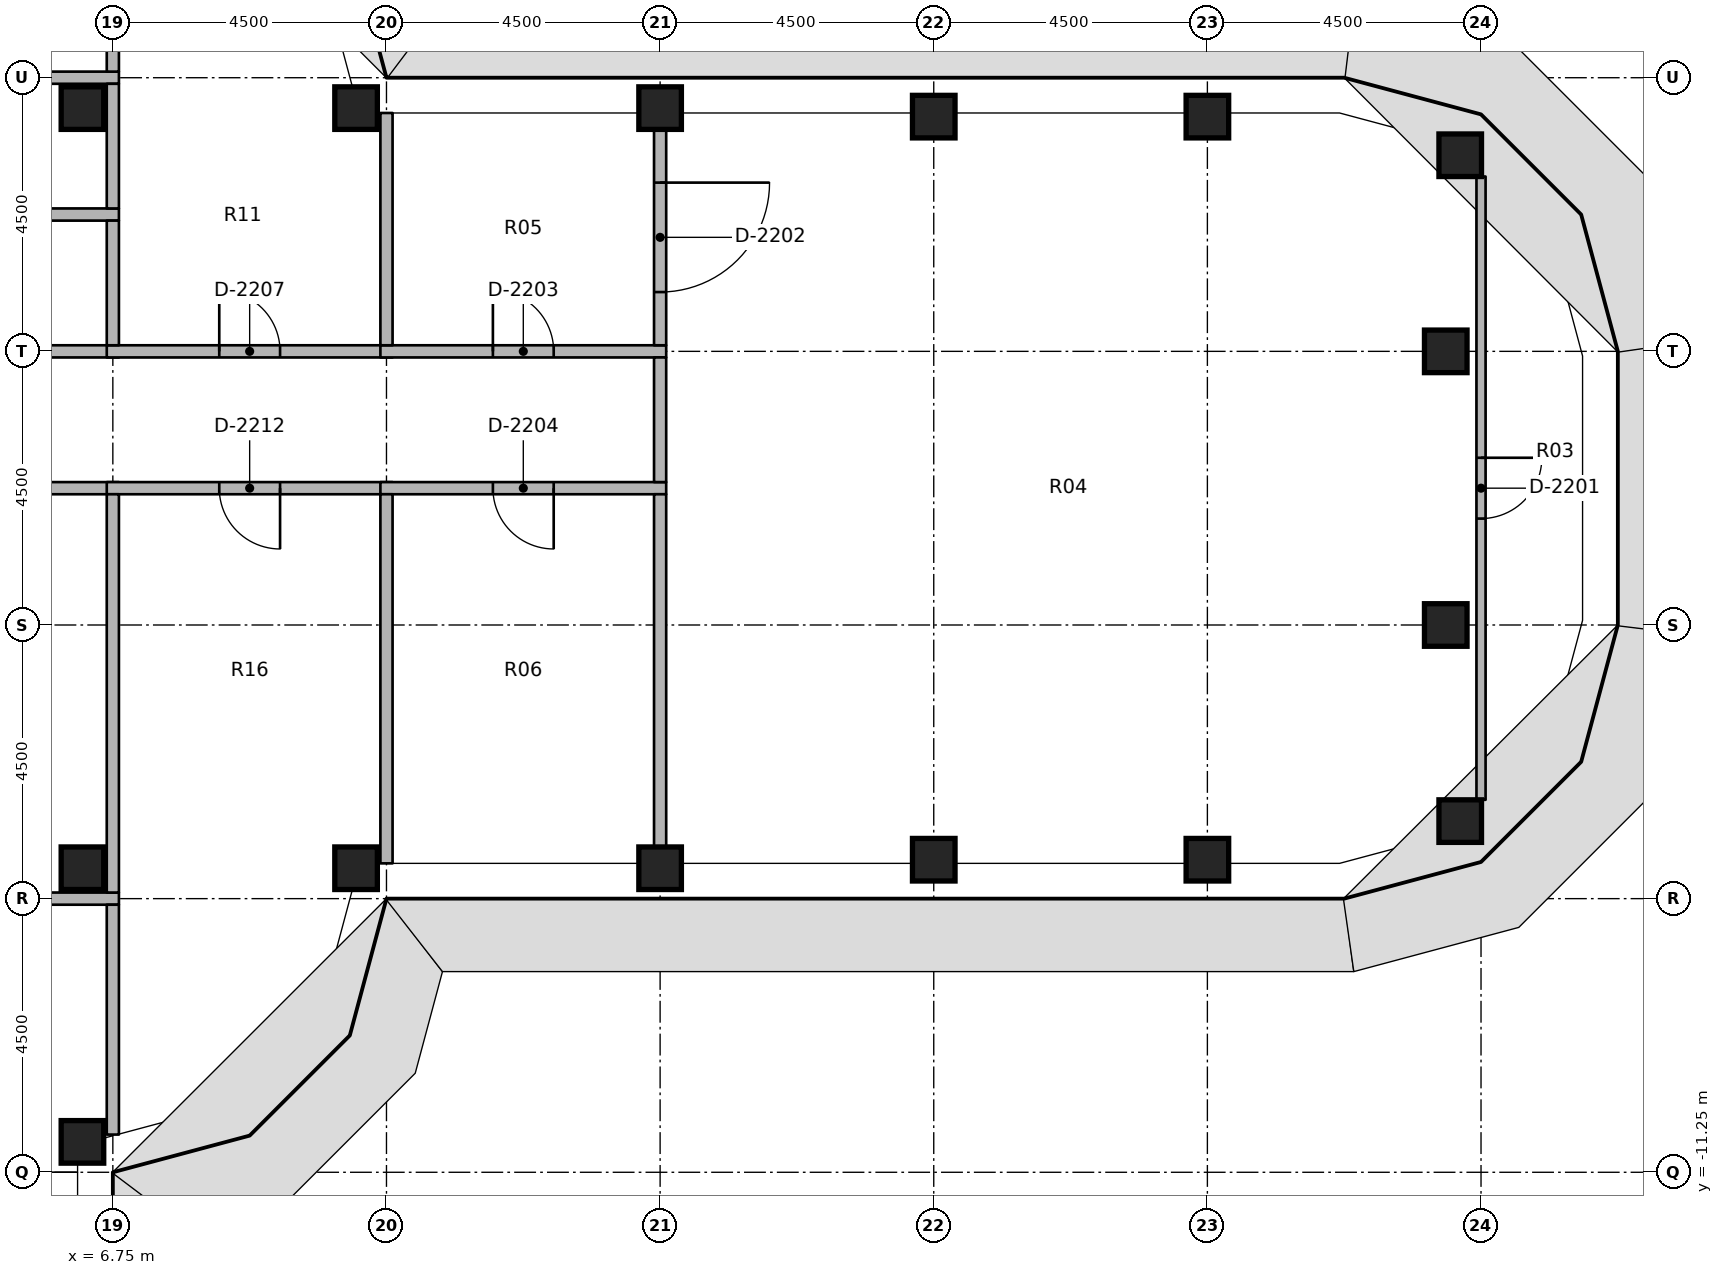
"""IFC4 building model, lengths in metres.
Left out: names, types, materials, properties, quantities, classifications, styles, units other than length and angle.
Written with IfcOpenShell. Run it as: python <this file> out.ifc"""

import sys

from ifc_helpers import new_model, si_unit, direction, frame, frame_2d, origin, origin_2d, place, context, subcontext, project, spatial, rectangle, extrude, element, fill, save


model = new_model("IFC4")
c1 = context("Model", 3, precision=1e-05, world=origin(), true_north=direction((0.0, 1.0)))
c2 = subcontext(c1, "Body", "Model", "MODEL_VIEW")
j1 = project(units=[si_unit("LENGTHUNIT", "METRE"), si_unit("PLANEANGLEUNIT", "RADIAN")], contexts=[c1])
p1 = place(None, origin())
s1 = spatial("IfcSite", under=j1, at=p1, CompositionType="ELEMENT")
p2 = place(p1, origin())
s2 = spatial("IfcBuilding", under=s1, at=p2, CompositionType="ELEMENT")
p3 = place(p2, frame((0.0, 0.0, 206.8)))
s3 = spatial("IfcBuildingStorey", under=s2, at=p3, CompositionType="ELEMENT", Elevation=206.8)
for number, where, z_axis, x_axis in (
    (1, (6.25, -10.75, 0.0), (0.0, 0.0, 1.0), (1.0, 0.0, 0.0)),
    (2, (6.25, -6.25, 0.0), (0.0, 0.0, 1.0), (1.0, 0.0, 0.0)),
    (3, (6.25, 6.25, 0.0), (0.0, 0.0, 1.0), (1.0, 0.0, 0.0)),
    (4, (10.75, -6.25, 0.0), (0.0, 0.0, 1.0), (1.0, 0.0, 0.0)),
    (5, (10.75, 6.25, 0.0), (0.0, 0.0, 1.0), (1.0, 0.0, 0.0)),
    (6, (15.75, -6.25, 0.0), (0.0, 0.0, 1.0), (1.0, 0.0, 0.0)),
    (7, (15.75, 6.25, 0.0), (0.0, 0.0, 1.0), (1.0, 0.0, 0.0)),
    (8, (20.25, -6.11, 0.0), (0.0, 0.0, 1.0), (1.0, 0.0, 0.0)),
    (9, (20.25, 6.11, 0.0), (0.0, 0.0, 1.0), (1.0, 0.0, 0.0)),
    (10, (24.75, -6.11, 0.0), (0.0, 0.0, 1.0), (1.0, 0.0, 0.0)),
    (11, (24.75, 6.11, 0.0), (0.0, 0.0, 1.0), (1.0, 0.0, 0.0)),
    (12, (28.908, -5.475, 0.0), (0.0, 0.0, 1.0), (1.0, 0.0, 0.0)),
    (13, (28.67, -2.25, 0.0), (0.0, 0.0, 1.0), (1.0, 0.0, 0.0)),
    (14, (28.67, 2.25, 0.0), (0.0, 0.0, 1.0), (1.0, 0.0, 0.0)),
    (15, (28.908, 5.475, 0.0), (0.0, 0.0, 1.0), (1.0, 0.0, 0.0)),
):
    element("IfcColumn", number, at=place(p3, frame(where, z_axis=z_axis, x_axis=x_axis)), inside=s3, PredefinedType="COLUMN", context=c2, shape_type="SweptSolid", body=[
        extrude(rectangle(XDim=0.7, YDim=0.7, at=origin_2d()), origin(), (0.0, 0.0, 1.0), 3.65),
    ])
p4 = place(p3, frame((1.025, 2.25, 0.0), z_axis=(0.0, 0.0, 1.0), x_axis=(1.0, 0.0, 0.0)))
e16 = element("IfcWall", 16, at=p4, inside=s3, PredefinedType="PARTITIONING", context=c2, shape_type="SweptSolid", body=[
    extrude(rectangle(XDim=5.825, YDim=0.2, at=frame_2d((2.913, 0.0))), origin(), (0.0, 0.0, 1.0), 2.75),
])
p5 = place(p4, frame((2.462, 0.0, 0.0)))
e17 = element("IfcOpeningElement", 17, at=p5, cuts=e16, PredefinedType="OPENING", context=c2, shape_type="SweptSolid", body=[
    extrude(rectangle(XDim=0.9, YDim=2.1, at=frame_2d((0.45, 1.05))), frame((0.0, 0.11, 0.0), z_axis=(0.0, -1.0, 0.0), x_axis=(1.0, 0.0, 0.0)), (0.0, 0.0, 1.0), 0.22),
])
p6 = place(p3, frame((6.65, 2.25, 0.0), z_axis=(0.0, 0.0, 1.0), x_axis=(1.0, 0.0, 0.0)))
e18 = element("IfcWall", 18, at=p6, inside=s3, PredefinedType="PARTITIONING", context=c2, shape_type="SweptSolid", body=[
    extrude(rectangle(XDim=4.7, YDim=0.2, at=frame_2d((2.35, 0.0))), origin(), (0.0, 0.0, 1.0), 2.75),
])
p7 = place(p6, frame((1.85, 0.0, 0.0)))
e19 = element("IfcOpeningElement", 19, at=p7, cuts=e18, PredefinedType="OPENING", context=c2, shape_type="SweptSolid", body=[
    extrude(rectangle(XDim=1.0, YDim=2.1, at=frame_2d((0.5, 1.05))), frame((0.0, 0.11, 0.0), z_axis=(0.0, -1.0, 0.0), x_axis=(1.0, 0.0, 0.0)), (0.0, 0.0, 1.0), 0.22),
])
p8 = place(p3, frame((6.85, 0.0, 0.0), z_axis=(0.0, 0.0, 1.0), x_axis=(-1.0, 0.0, 0.0)))
e20 = element("IfcWall", 20, at=p8, inside=s3, PredefinedType="PARTITIONING", context=c2, shape_type="SweptSolid", body=[
    extrude(rectangle(XDim=5.825, YDim=0.2, at=frame_2d((2.913, 0.0))), origin(), (0.0, 0.0, 1.0), 2.75),
])
p9 = place(p8, frame((2.413, 0.0, 0.0)))
e21 = element("IfcOpeningElement", 21, at=p9, cuts=e20, PredefinedType="OPENING", context=c2, shape_type="SweptSolid", body=[
    extrude(rectangle(XDim=1.0, YDim=2.1, at=frame_2d((0.5, 1.05))), frame((0.0, 0.11, 0.0), z_axis=(0.0, -1.0, 0.0), x_axis=(1.0, 0.0, 0.0)), (0.0, 0.0, 1.0), 0.22),
])
p10 = place(p3, frame((11.35, 0.0, 0.0), z_axis=(0.0, 0.0, 1.0), x_axis=(-1.0, 0.0, 0.0)))
e22 = element("IfcWall", 22, at=p10, inside=s3, PredefinedType="PARTITIONING", context=c2, shape_type="SweptSolid", body=[
    extrude(rectangle(XDim=4.7, YDim=0.2, at=frame_2d((2.35, 0.0))), origin(), (0.0, 0.0, 1.0), 2.75),
])
p11 = place(p10, frame((1.85, 0.0, 0.0)))
e23 = element("IfcOpeningElement", 23, at=p11, cuts=e22, PredefinedType="OPENING", context=c2, shape_type="SweptSolid", body=[
    extrude(rectangle(XDim=1.0, YDim=2.1, at=frame_2d((0.5, 1.05))), frame((0.0, 0.11, 0.0), z_axis=(0.0, -1.0, 0.0), x_axis=(1.0, 0.0, 0.0)), (0.0, 0.0, 1.0), 0.22),
])
p12 = place(p3, frame((11.15, 2.25, 0.0), z_axis=(0.0, 0.0, 1.0), x_axis=(1.0, 0.0, 0.0)))
e24 = element("IfcWall", 24, at=p12, inside=s3, PredefinedType="PARTITIONING", context=c2, shape_type="SweptSolid", body=[
    extrude(rectangle(XDim=4.7, YDim=0.2, at=frame_2d((2.35, 0.0))), origin(), (0.0, 0.0, 1.0), 2.75),
])
p13 = place(p12, frame((1.85, 0.0, 0.0)))
e25 = element("IfcOpeningElement", 25, at=p13, cuts=e24, PredefinedType="OPENING", context=c2, shape_type="SweptSolid", body=[
    extrude(rectangle(XDim=1.0, YDim=2.1, at=frame_2d((0.5, 1.05))), frame((0.0, 0.11, 0.0), z_axis=(0.0, -1.0, 0.0), x_axis=(1.0, 0.0, 0.0)), (0.0, 0.0, 1.0), 0.22),
])
p14 = place(p3, frame((15.85, 0.0, 0.0), z_axis=(0.0, 0.0, 1.0), x_axis=(-1.0, 0.0, 0.0)))
e26 = element("IfcWall", 26, at=p14, inside=s3, PredefinedType="PARTITIONING", context=c2, shape_type="SweptSolid", body=[
    extrude(rectangle(XDim=4.7, YDim=0.2, at=frame_2d((2.35, 0.0))), origin(), (0.0, 0.0, 1.0), 2.75),
])
p15 = place(p14, frame((1.85, 0.0, 0.0)))
e27 = element("IfcOpeningElement", 27, at=p15, cuts=e26, PredefinedType="OPENING", context=c2, shape_type="SweptSolid", body=[
    extrude(rectangle(XDim=1.0, YDim=2.1, at=frame_2d((0.5, 1.05))), frame((0.0, 0.11, 0.0), z_axis=(0.0, -1.0, 0.0), x_axis=(1.0, 0.0, 0.0)), (0.0, 0.0, 1.0), 0.22),
])
p16 = place(p3, frame((15.75, 0.1, 0.0), z_axis=(0.0, 0.0, 1.0), x_axis=(0.0, 1.0, 0.0)))
e28 = element("IfcWall", 28, at=p16, inside=s3, PredefinedType="PARTITIONING", context=c2, shape_type="SweptSolid", body=[
    extrude(rectangle(XDim=2.05, YDim=0.2, at=frame_2d((1.025, 0.0))), origin(), (0.0, 0.0, 1.0), 2.75),
])
p17 = place(p3, frame((1.025, 6.75, 0.0), z_axis=(0.0, 0.0, 1.0), x_axis=(1.0, 0.0, 0.0)))
e29 = element("IfcWall", 29, at=p17, inside=s3, PredefinedType="PARTITIONING", context=c2, shape_type="SweptSolid", body=[
    extrude(rectangle(XDim=5.825, YDim=0.2, at=frame_2d((2.913, 0.0))), origin(), (0.0, 0.0, 1.0), 2.75),
])
p18 = place(p3, frame((6.75, 6.85, 0.0), z_axis=(0.0, 0.0, 1.0), x_axis=(0.0, 1.0, 0.0)))
e30 = element("IfcWall", 30, at=p18, inside=s3, PredefinedType="PARTITIONING", context=c2, shape_type="SweptSolid", body=[
    extrude(rectangle(XDim=3.78, YDim=0.2, at=frame_2d((1.89, 0.0))), origin(), (0.0, 0.0, 1.0), 2.75),
])
p19 = place(p3, frame((1.025, -6.75, 0.0), z_axis=(0.0, 0.0, 1.0), x_axis=(1.0, 0.0, 0.0)))
e31 = element("IfcWall", 31, at=p19, inside=s3, PredefinedType="PARTITIONING", context=c2, shape_type="SweptSolid", body=[
    extrude(rectangle(XDim=5.825, YDim=0.2, at=frame_2d((2.913, 0.0))), origin(), (0.0, 0.0, 1.0), 2.75),
])
p20 = place(p3, frame((6.75, -10.63, 0.0), z_axis=(0.0, 0.0, 1.0), x_axis=(0.0, 1.0, 0.0)))
e32 = element("IfcWall", 32, at=p20, inside=s3, PredefinedType="PARTITIONING", context=c2, shape_type="SweptSolid", body=[
    extrude(rectangle(XDim=3.78, YDim=0.2, at=frame_2d((1.89, 0.0))), origin(), (0.0, 0.0, 1.0), 2.75),
])
p21 = place(p3, frame((1.025, 4.5, 0.0), z_axis=(0.0, 0.0, 1.0), x_axis=(1.0, 0.0, 0.0)))
e33 = element("IfcWall", 33, at=p21, inside=s3, PredefinedType="PARTITIONING", context=c2, shape_type="SweptSolid", body=[
    extrude(rectangle(XDim=5.825, YDim=0.2, at=frame_2d((2.913, 0.0))), origin(), (0.0, 0.0, 1.0), 2.75),
])
for number, where, z_axis, x_axis in (
    (34, (6.75, 2.35, 0.0), (0.0, 0.0, 1.0), (0.0, 1.0, 0.0)),
    (35, (6.75, 4.6, 0.0), (0.0, 0.0, 1.0), (0.0, 1.0, 0.0)),
):
    element("IfcWall", number, at=place(p3, frame(where, z_axis=z_axis, x_axis=x_axis)), inside=s3, PredefinedType="PARTITIONING", context=c2, shape_type="SweptSolid", body=[
        extrude(rectangle(XDim=2.05, YDim=0.2, at=frame_2d((1.025, 0.0))), origin(), (0.0, 0.0, 1.0), 2.75),
    ])
p22 = place(p3, frame((11.25, 2.35, 0.0), z_axis=(0.0, 0.0, 1.0), x_axis=(0.0, 1.0, 0.0)))
e36 = element("IfcWall", 36, at=p22, inside=s3, PredefinedType="PARTITIONING", context=c2, shape_type="SweptSolid", body=[
    extrude(rectangle(XDim=3.82, YDim=0.2, at=frame_2d((1.91, 0.0))), origin(), (0.0, 0.0, 1.0), 2.75),
])
p23 = place(p3, frame((6.75, -6.65, 0.0), z_axis=(0.0, 0.0, 1.0), x_axis=(0.0, 1.0, 0.0)))
e37 = element("IfcWall", 37, at=p23, inside=s3, PredefinedType="PARTITIONING", context=c2, shape_type="SweptSolid", body=[
    extrude(rectangle(XDim=6.55, YDim=0.2, at=frame_2d((3.275, 0.0))), origin(), (0.0, 0.0, 1.0), 2.75),
])
p24 = place(p3, frame((11.25, -6.17, 0.0), z_axis=(0.0, 0.0, 1.0), x_axis=(0.0, 1.0, 0.0)))
e38 = element("IfcWall", 38, at=p24, inside=s3, PredefinedType="PARTITIONING", context=c2, shape_type="SweptSolid", body=[
    extrude(rectangle(XDim=6.07, YDim=0.2, at=frame_2d((3.035, 0.0))), origin(), (0.0, 0.0, 1.0), 2.75),
])
p25 = place(p3, frame((15.75, 5.9, 0.0), z_axis=(0.0, 0.0, 1.0), x_axis=(0.0, -1.0, 0.0)))
e39 = element("IfcWall", 39, at=p25, inside=s3, PredefinedType="PARTITIONING", context=c2, shape_type="SweptSolid", body=[
    extrude(rectangle(XDim=3.55, YDim=0.2, at=frame_2d((1.775, 0.0))), origin(), (0.0, 0.0, 1.0), 2.75),
])
p26 = place(p25, frame((0.875, 0.0, 0.0)))
e40 = element("IfcOpeningElement", 40, at=p26, cuts=e39, PredefinedType="OPENING", context=c2, shape_type="SweptSolid", body=[
    extrude(rectangle(XDim=1.8, YDim=2.1, at=frame_2d((0.9, 1.05))), frame((0.0, 0.11, 0.0), z_axis=(0.0, -1.0, 0.0), x_axis=(1.0, 0.0, 0.0)), (0.0, 0.0, 1.0), 0.22),
])
p27 = place(p3, frame((15.75, -5.9, 0.0), z_axis=(0.0, 0.0, 1.0), x_axis=(0.0, 1.0, 0.0)))
e41 = element("IfcWall", 41, at=p27, inside=s3, PredefinedType="PARTITIONING", context=c2, shape_type="SweptSolid", body=[
    extrude(rectangle(XDim=5.8, YDim=0.2, at=frame_2d((2.9, 0.0))), origin(), (0.0, 0.0, 1.0), 2.75),
])
p28 = place(p3, frame((29.25, 5.125, 0.0), z_axis=(0.0, 0.0, 1.0), x_axis=(0.0, -1.0, 0.0)))
e42 = element("IfcWall", 42, at=p28, inside=s3, PredefinedType="PARTITIONING", context=c2, shape_type="SweptSolid", body=[
    extrude(rectangle(XDim=10.25, YDim=0.15, at=frame_2d((5.125, 0.0))), origin(), (0.0, 0.0, 1.0), 2.75),
])
p29 = place(p28, frame((4.625, 0.0, 0.0)))
e43 = element("IfcOpeningElement", 43, at=p29, cuts=e42, PredefinedType="OPENING", context=c2, shape_type="SweptSolid", body=[
    extrude(rectangle(XDim=1.0, YDim=2.1, at=frame_2d((0.5, 1.05))), frame((0.0, 0.085, 0.0), z_axis=(0.0, -1.0, 0.0), x_axis=(1.0, 0.0, 0.0)), (0.0, 0.0, 1.0), 0.17),
])
p30 = place(p29, origin())
e44 = element("IfcDoor", 44, at=p30, inside=s3, OperationType="SINGLE_SWING_RIGHT", PredefinedType="DOOR", context=c2, shape_type="SweptSolid", body=[
    extrude(rectangle(XDim=1.0, YDim=2.1, at=frame_2d((0.5, 1.05))), frame((0.0, 0.025, 0.0), z_axis=(0.0, -1.0, 0.0), x_axis=(1.0, 0.0, 0.0)), (0.0, 0.0, 1.0), 0.05),
])
fill(e43, e44)
p31 = place(p26, origin())
e45 = element("IfcDoor", 45, at=p31, inside=s3, OperationType="DOUBLE_DOOR_SINGLE_SWING", PredefinedType="DOOR", context=c2, shape_type="SweptSolid", body=[
    extrude(rectangle(XDim=1.8, YDim=2.1, at=frame_2d((0.9, 1.05))), frame((0.0, 0.025, 0.0), z_axis=(0.0, -1.0, 0.0), x_axis=(1.0, 0.0, 0.0)), (0.0, 0.0, 1.0), 0.05),
])
fill(e40, e45)
p32 = place(p13, origin())
e46 = element("IfcDoor", 46, at=p32, inside=s3, OperationType="SINGLE_SWING_RIGHT", PredefinedType="DOOR", context=c2, shape_type="SweptSolid", body=[
    extrude(rectangle(XDim=1.0, YDim=2.1, at=frame_2d((0.5, 1.05))), frame((0.0, 0.025, 0.0), z_axis=(0.0, -1.0, 0.0), x_axis=(1.0, 0.0, 0.0)), (0.0, 0.0, 1.0), 0.05),
])
fill(e25, e46)
p33 = place(p15, origin())
e47 = element("IfcDoor", 47, at=p33, inside=s3, OperationType="SINGLE_SWING_RIGHT", PredefinedType="DOOR", context=c2, shape_type="SweptSolid", body=[
    extrude(rectangle(XDim=1.0, YDim=2.1, at=frame_2d((0.5, 1.05))), frame((0.0, 0.025, 0.0), z_axis=(0.0, -1.0, 0.0), x_axis=(1.0, 0.0, 0.0)), (0.0, 0.0, 1.0), 0.05),
])
fill(e27, e47)
p34 = place(p7, origin())
e48 = element("IfcDoor", 48, at=p34, inside=s3, OperationType="SINGLE_SWING_RIGHT", PredefinedType="DOOR", context=c2, shape_type="SweptSolid", body=[
    extrude(rectangle(XDim=1.0, YDim=2.1, at=frame_2d((0.5, 1.05))), frame((0.0, 0.025, 0.0), z_axis=(0.0, -1.0, 0.0), x_axis=(1.0, 0.0, 0.0)), (0.0, 0.0, 1.0), 0.05),
])
fill(e19, e48)
p35 = place(p11, origin())
e49 = element("IfcDoor", 49, at=p35, inside=s3, OperationType="SINGLE_SWING_RIGHT", PredefinedType="DOOR", context=c2, shape_type="SweptSolid", body=[
    extrude(rectangle(XDim=1.0, YDim=2.1, at=frame_2d((0.5, 1.05))), frame((0.0, 0.025, 0.0), z_axis=(0.0, -1.0, 0.0), x_axis=(1.0, 0.0, 0.0)), (0.0, 0.0, 1.0), 0.05),
])
fill(e23, e49)
save(model, sys.argv[1])
